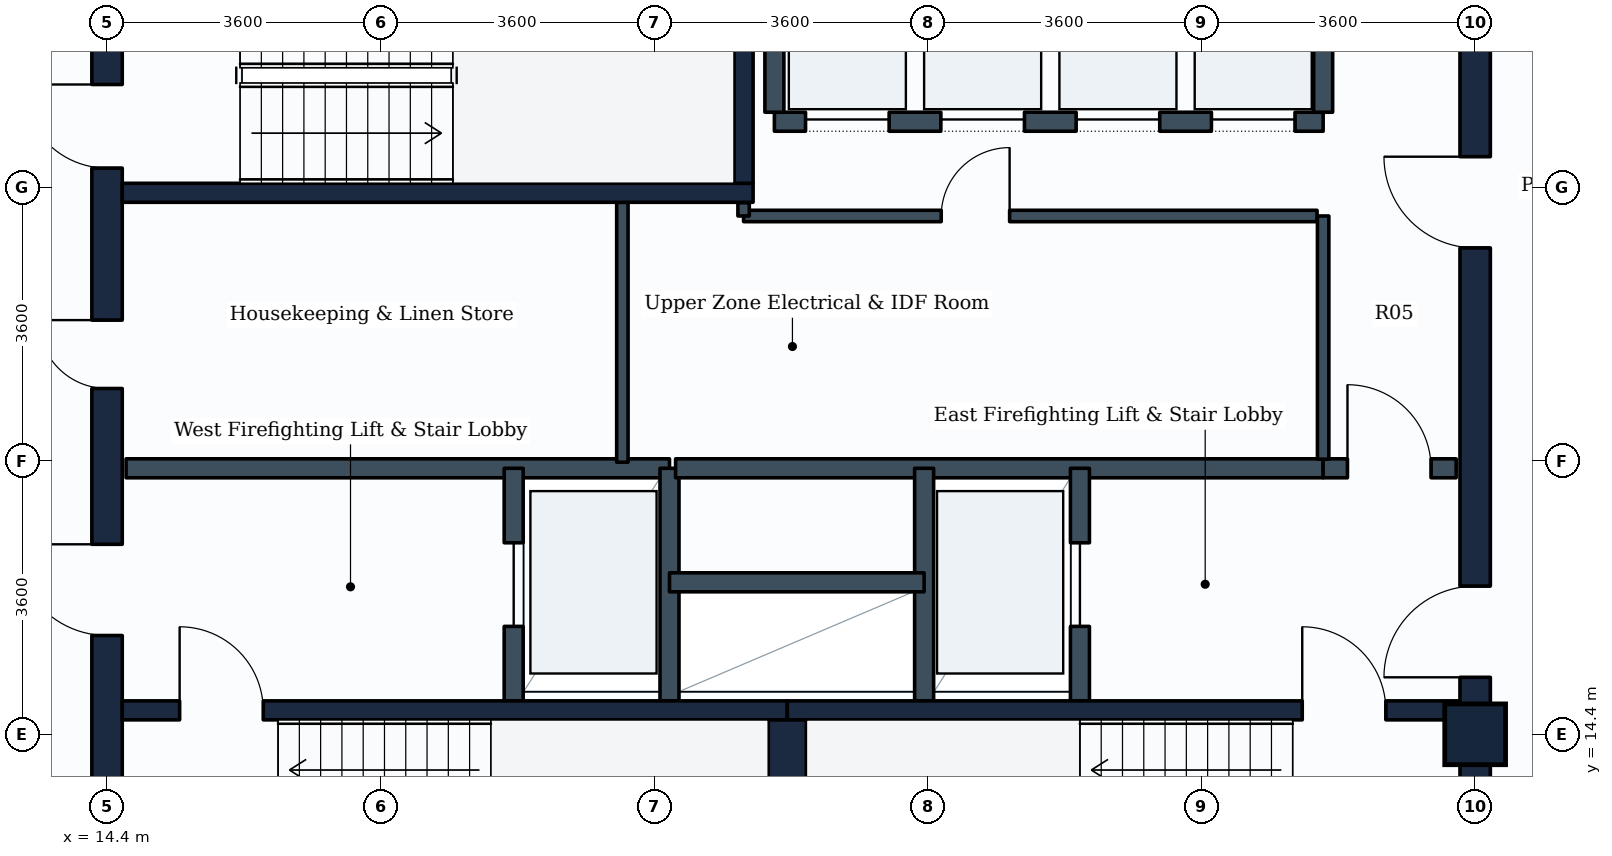
"""IFC4 building model, lengths in metres.
Left out: names, types, materials, properties, quantities, classifications, styles, units other than length and angle.
Written with IfcOpenShell. Run it as: python <this file> out.ifc"""

import sys

from ifc_helpers import new_model, si_unit, direction, frame, frame_2d, origin, origin_2d, place, context, subcontext, project, spatial, rectangle, extrude, element, fill, save


model = new_model("IFC4")
c1 = context("Model", 3, precision=1e-05, world=origin(), true_north=direction((0.0, 1.0)))
c2 = subcontext(c1, "Body", "Model", "MODEL_VIEW")
j1 = project(units=[si_unit("LENGTHUNIT", "METRE"), si_unit("PLANEANGLEUNIT", "RADIAN")], contexts=[c1])
p1 = place(None, origin())
s1 = spatial("IfcSite", under=j1, at=p1, CompositionType="ELEMENT")
p2 = place(p1, origin())
s2 = spatial("IfcBuilding", under=s1, at=p2, CompositionType="ELEMENT")
p3 = place(p2, frame((0.0, 0.0, 266.6)))
s3 = spatial("IfcBuildingStorey", under=s2, at=p3, CompositionType="ELEMENT", Elevation=266.6)
p4 = place(p3, frame((32.4, 14.4, 0.0), z_axis=(0.0, 0.0, 1.0), x_axis=(1.0, 0.0, 0.0)))
e1 = element("IfcColumn", 1, at=p4, inside=s3, PredefinedType="COLUMN", context=c2, shape_type="SweptSolid", body=[
    extrude(rectangle(XDim=0.8, YDim=0.8, at=origin_2d()), origin(), (0.0, 0.0, 1.0), 3.6),
])
p5 = place(p3, frame((14.4, 10.8, 0.0), z_axis=(0.0, 0.0, 1.0), x_axis=(0.0, 1.0, 0.0)))
e2 = element("IfcWall", 2, at=p5, inside=s3, PredefinedType="SHEAR", context=c2, shape_type="SweptSolid", body=[
    extrude(rectangle(XDim=14.4, YDim=0.4, at=frame_2d((7.2, 0.0))), origin(), (0.0, 0.0, 1.0), 3.35),
])
p6 = place(p5, frame((11.05, 0.0, 0.0)))
e3 = element("IfcOpeningElement", 3, at=p6, cuts=e2, PredefinedType="OPENING", context=c2, shape_type="SweptSolid", body=[
    extrude(rectangle(XDim=1.1, YDim=2.1, at=frame_2d((0.55, 1.05))), frame((0.0, 0.21, 0.0), z_axis=(0.0, -1.0, 0.0), x_axis=(1.0, 0.0, 0.0)), (0.0, 0.0, 1.0), 0.42),
])
p7 = place(p5, frame((4.9, 0.0, 0.0)))
e4 = element("IfcOpeningElement", 4, at=p7, cuts=e2, PredefinedType="OPENING", context=c2, shape_type="SweptSolid", body=[
    extrude(rectangle(XDim=1.2, YDim=2.1, at=frame_2d((0.6, 1.05))), frame((0.0, 0.21, 0.0), z_axis=(0.0, -1.0, 0.0), x_axis=(1.0, 0.0, 0.0)), (0.0, 0.0, 1.0), 0.42),
])
p8 = place(p5, frame((8.15, 0.0, 0.0)))
e5 = element("IfcOpeningElement", 5, at=p8, cuts=e2, PredefinedType="OPENING", context=c2, shape_type="SweptSolid", body=[
    extrude(rectangle(XDim=0.9, YDim=2.1, at=frame_2d((0.45, 1.05))), frame((0.0, 0.21, 0.0), z_axis=(0.0, -1.0, 0.0), x_axis=(1.0, 0.0, 0.0)), (0.0, 0.0, 1.0), 0.42),
])
p9 = place(p3, frame((32.4, 10.8, 0.0), z_axis=(0.0, 0.0, 1.0), x_axis=(0.0, 1.0, 0.0)))
e6 = element("IfcWall", 6, at=p9, inside=s3, PredefinedType="SHEAR", context=c2, shape_type="SweptSolid", body=[
    extrude(rectangle(XDim=14.4, YDim=0.4, at=frame_2d((7.2, 0.0))), origin(), (0.0, 0.0, 1.0), 3.35),
])
p10 = place(p9, frame((4.35, 0.0, 0.0)))
e7 = element("IfcOpeningElement", 7, at=p10, cuts=e6, PredefinedType="OPENING", context=c2, shape_type="SweptSolid", body=[
    extrude(rectangle(XDim=1.2, YDim=2.1, at=frame_2d((0.6, 1.05))), frame((0.0, 0.21, 0.0), z_axis=(0.0, -1.0, 0.0), x_axis=(1.0, 0.0, 0.0)), (0.0, 0.0, 1.0), 0.42),
])
p11 = place(p9, frame((10.0, 0.0, 0.0)))
e8 = element("IfcOpeningElement", 8, at=p11, cuts=e6, PredefinedType="OPENING", context=c2, shape_type="SweptSolid", body=[
    extrude(rectangle(XDim=1.2, YDim=2.1, at=frame_2d((0.6, 1.05))), frame((0.0, 0.21, 0.0), z_axis=(0.0, -1.0, 0.0), x_axis=(1.0, 0.0, 0.0)), (0.0, 0.0, 1.0), 0.42),
])
p12 = place(p3, frame((14.6, 14.715, 0.0), z_axis=(0.0, 0.0, 1.0), x_axis=(1.0, 0.0, 0.0)))
e9 = element("IfcWall", 9, at=p12, inside=s3, PredefinedType="SHEAR", context=c2, shape_type="SweptSolid", body=[
    extrude(rectangle(XDim=8.75, YDim=0.25, at=frame_2d((4.375, 0.0))), origin(), (0.0, 0.0, 1.0), 3.35),
])
p13 = place(p12, frame((0.755, 0.0, 0.0)))
e10 = element("IfcOpeningElement", 10, at=p13, cuts=e9, PredefinedType="OPENING", context=c2, shape_type="SweptSolid", body=[
    extrude(rectangle(XDim=1.1, YDim=2.1, at=frame_2d((0.55, 1.05))), frame((0.0, 0.135, 0.0), z_axis=(0.0, -1.0, 0.0), x_axis=(1.0, 0.0, 0.0)), (0.0, 0.0, 1.0), 0.27),
])
p14 = place(p3, frame((23.35, 14.715, 0.0), z_axis=(0.0, 0.0, 1.0), x_axis=(1.0, 0.0, 0.0)))
e11 = element("IfcWall", 11, at=p14, inside=s3, PredefinedType="SHEAR", context=c2, shape_type="SweptSolid", body=[
    extrude(rectangle(XDim=8.85, YDim=0.25, at=frame_2d((4.425, 0.0))), origin(), (0.0, 0.0, 1.0), 3.35),
])
p15 = place(p14, frame((6.775, 0.0, 0.0)))
e12 = element("IfcOpeningElement", 12, at=p15, cuts=e11, PredefinedType="OPENING", context=c2, shape_type="SweptSolid", body=[
    extrude(rectangle(XDim=1.1, YDim=2.1, at=frame_2d((0.55, 1.05))), frame((0.0, 0.135, 0.0), z_axis=(0.0, -1.0, 0.0), x_axis=(1.0, 0.0, 0.0)), (0.0, 0.0, 1.0), 0.27),
])
p16 = place(p3, frame((23.35, 11.75, 0.0), z_axis=(0.0, 0.0, 1.0), x_axis=(0.0, 1.0, 0.0)))
e13 = element("IfcWall", 13, at=p16, inside=s3, PredefinedType="SHEAR", context=c2, shape_type="SweptSolid", body=[
    extrude(rectangle(XDim=2.84, YDim=0.5, at=frame_2d((1.42, 0.0))), origin(), (0.0, 0.0, 1.0), 3.35),
])
p17 = place(p3, frame((14.6, 21.525, 0.0), z_axis=(0.0, 0.0, 1.0), x_axis=(1.0, 0.0, 0.0)))
e14 = element("IfcWall", 14, at=p17, inside=s3, PredefinedType="SHEAR", context=c2, shape_type="SweptSolid", body=[
    extrude(rectangle(XDim=8.3, YDim=0.25, at=frame_2d((4.15, 0.0))), origin(), (0.0, 0.0, 1.0), 3.35),
])
p18 = place(p3, frame((22.775, 21.65, 0.0), z_axis=(0.0, 0.0, 1.0), x_axis=(0.0, 1.0, 0.0)))
e15 = element("IfcWall", 15, at=p18, inside=s3, PredefinedType="SHEAR", context=c2, shape_type="SweptSolid", body=[
    extrude(rectangle(XDim=2.84, YDim=0.25, at=frame_2d((1.42, 0.0))), origin(), (0.0, 0.0, 1.0), 3.35),
])
p19 = place(p3, frame((14.65, 17.9, 0.0), z_axis=(0.0, 0.0, 1.0), x_axis=(1.0, 0.0, 0.0)))
e16 = element("IfcWall", 16, at=p19, inside=s3, PredefinedType="PARTITIONING", context=c2, shape_type="SweptSolid", body=[
    extrude(rectangle(XDim=7.15, YDim=0.25, at=frame_2d((3.575, 0.0))), origin(), (0.0, 0.0, 1.0), 3.335),
])
p20 = place(p3, frame((19.75, 14.84, 0.0), z_axis=(0.0, 0.0, 1.0), x_axis=(0.0, 1.0, 0.0)))
e17 = element("IfcWall", 17, at=p20, inside=s3, PredefinedType="PARTITIONING", context=c2, shape_type="SweptSolid", body=[
    extrude(rectangle(XDim=3.06, YDim=0.25, at=frame_2d((1.53, 0.0))), origin(), (0.0, 0.0, 1.0), 3.335),
])
p21 = place(p20, frame((0.98, 0.0, 0.0)))
e18 = element("IfcOpeningElement", 18, at=p21, cuts=e17, PredefinedType="OPENING", context=c2, shape_type="SweptSolid", body=[
    extrude(rectangle(XDim=1.1, YDim=2.1, at=frame_2d((0.55, 1.05))), frame((0.0, 0.135, 0.0), z_axis=(0.0, -1.0, 0.0), x_axis=(1.0, 0.0, 0.0)), (0.0, 0.0, 1.0), 0.27),
])
p22 = place(p3, frame((21.8, 14.84, 0.0), z_axis=(0.0, 0.0, 1.0), x_axis=(0.0, 1.0, 0.0)))
e19 = element("IfcWall", 19, at=p22, inside=s3, PredefinedType="PARTITIONING", context=c2, shape_type="SweptSolid", body=[
    extrude(rectangle(XDim=3.06, YDim=0.25, at=frame_2d((1.53, 0.0))), origin(), (0.0, 0.0, 1.0), 3.335),
])
p23 = place(p3, frame((21.88, 17.9, 0.0), z_axis=(0.0, 0.0, 1.0), x_axis=(1.0, 0.0, 0.0)))
e20 = element("IfcWall", 20, at=p23, inside=s3, PredefinedType="PARTITIONING", context=c2, shape_type="SweptSolid", body=[
    extrude(rectangle(XDim=8.52, YDim=0.25, at=frame_2d((4.26, 0.0))), origin(), (0.0, 0.0, 1.0), 3.335),
])
p24 = place(p3, frame((30.4, 17.9, 0.0), z_axis=(0.0, 0.0, 1.0), x_axis=(1.0, 0.0, 0.0)))
e21 = element("IfcWall", 21, at=p24, inside=s3, PredefinedType="PARTITIONING", context=c2, shape_type="SweptSolid", body=[
    extrude(rectangle(XDim=1.75, YDim=0.25, at=frame_2d((0.875, 0.0))), origin(), (0.0, 0.0, 1.0), 3.335),
])
p25 = place(p24, frame((0.32, 0.0, 0.0)))
e22 = element("IfcOpeningElement", 22, at=p25, cuts=e21, PredefinedType="OPENING", context=c2, shape_type="SweptSolid", body=[
    extrude(rectangle(XDim=1.1, YDim=2.1, at=frame_2d((0.55, 1.05))), frame((0.0, 0.135, 0.0), z_axis=(0.0, -1.0, 0.0), x_axis=(1.0, 0.0, 0.0)), (0.0, 0.0, 1.0), 0.27),
])
p26 = place(p3, frame((25.15, 14.84, 0.0), z_axis=(0.0, 0.0, 1.0), x_axis=(0.0, 1.0, 0.0)))
e23 = element("IfcWall", 23, at=p26, inside=s3, PredefinedType="PARTITIONING", context=c2, shape_type="SweptSolid", body=[
    extrude(rectangle(XDim=3.06, YDim=0.25, at=frame_2d((1.53, 0.0))), origin(), (0.0, 0.0, 1.0), 3.335),
])
p27 = place(p3, frame((27.2, 14.84, 0.0), z_axis=(0.0, 0.0, 1.0), x_axis=(0.0, 1.0, 0.0)))
e24 = element("IfcWall", 24, at=p27, inside=s3, PredefinedType="PARTITIONING", context=c2, shape_type="SweptSolid", body=[
    extrude(rectangle(XDim=3.06, YDim=0.25, at=frame_2d((1.53, 0.0))), origin(), (0.0, 0.0, 1.0), 3.335),
])
p28 = place(p27, frame((0.98, 0.0, 0.0)))
e25 = element("IfcOpeningElement", 25, at=p28, cuts=e24, PredefinedType="OPENING", context=c2, shape_type="SweptSolid", body=[
    extrude(rectangle(XDim=1.1, YDim=2.1, at=frame_2d((0.55, 1.05))), frame((0.0, 0.135, 0.0), z_axis=(0.0, -1.0, 0.0), x_axis=(1.0, 0.0, 0.0)), (0.0, 0.0, 1.0), 0.27),
])
p29 = place(p3, frame((21.8, 16.4, 0.0), z_axis=(0.0, 0.0, 1.0), x_axis=(1.0, 0.0, 0.0)))
e26 = element("IfcWall", 26, at=p29, inside=s3, PredefinedType="PARTITIONING", context=c2, shape_type="SweptSolid", body=[
    extrude(rectangle(XDim=3.35, YDim=0.25, at=frame_2d((1.675, 0.0))), origin(), (0.0, 0.0, 1.0), 3.335),
])
p30 = place(p3, frame((23.18, 22.46, 0.0), z_axis=(0.0, 0.0, 1.0), x_axis=(1.0, 0.0, 0.0)))
e27 = element("IfcWall", 27, at=p30, inside=s3, PredefinedType="PARTITIONING", context=c2, shape_type="SweptSolid", body=[
    extrude(rectangle(XDim=7.22, YDim=0.25, at=frame_2d((3.61, 0.0))), origin(), (0.0, 0.0, 1.0), 3.335),
])
p31 = place(p30, frame((0.41, 0.0, 0.0)))
e28 = element("IfcOpeningElement", 28, at=p31, cuts=e27, PredefinedType="OPENING", context=c2, shape_type="SweptSolid", body=[
    extrude(rectangle(XDim=1.1, YDim=2.1, at=frame_2d((0.55, 1.05))), frame((0.0, 0.135, 0.0), z_axis=(0.0, -1.0, 0.0), x_axis=(1.0, 0.0, 0.0)), (0.0, 0.0, 1.0), 0.27),
])
p32 = place(p30, frame((2.19, 0.0, 0.0)))
e29 = element("IfcOpeningElement", 29, at=p32, cuts=e27, PredefinedType="OPENING", context=c2, shape_type="SweptSolid", body=[
    extrude(rectangle(XDim=1.1, YDim=2.1, at=frame_2d((0.55, 1.05))), frame((0.0, 0.135, 0.0), z_axis=(0.0, -1.0, 0.0), x_axis=(1.0, 0.0, 0.0)), (0.0, 0.0, 1.0), 0.27),
])
p33 = place(p30, frame((3.97, 0.0, 0.0)))
e30 = element("IfcOpeningElement", 30, at=p33, cuts=e27, PredefinedType="OPENING", context=c2, shape_type="SweptSolid", body=[
    extrude(rectangle(XDim=1.1, YDim=2.1, at=frame_2d((0.55, 1.05))), frame((0.0, 0.135, 0.0), z_axis=(0.0, -1.0, 0.0), x_axis=(1.0, 0.0, 0.0)), (0.0, 0.0, 1.0), 0.27),
])
p34 = place(p30, frame((5.75, 0.0, 0.0)))
e31 = element("IfcOpeningElement", 31, at=p34, cuts=e27, PredefinedType="OPENING", context=c2, shape_type="SweptSolid", body=[
    extrude(rectangle(XDim=1.1, YDim=2.1, at=frame_2d((0.55, 1.05))), frame((0.0, 0.135, 0.0), z_axis=(0.0, -1.0, 0.0), x_axis=(1.0, 0.0, 0.0)), (0.0, 0.0, 1.0), 0.27),
])
for number, where, z_axis, x_axis in (
    (32, (23.18, 22.585, 0.0), (0.0, 0.0, 1.0), (0.0, 1.0, 0.0)),
    (33, (30.4, 22.585, 0.0), (0.0, 0.0, 1.0), (0.0, 1.0, 0.0)),
):
    element("IfcWall", number, at=place(p3, frame(where, z_axis=z_axis, x_axis=x_axis)), inside=s3, PredefinedType="PARTITIONING", context=c2, shape_type="SweptSolid", body=[
        extrude(rectangle(XDim=2.315, YDim=0.25, at=frame_2d((1.157, 0.0))), origin(), (0.0, 0.0, 1.0), 3.335),
    ])
p35 = place(p3, frame((22.775, 21.22, 0.0), z_axis=(0.0, 0.0, 1.0), x_axis=(1.0, 0.0, 0.0)))
e34 = element("IfcWall", 34, at=p35, inside=s3, PredefinedType="PARTITIONING", context=c2, shape_type="SweptSolid", body=[
    extrude(rectangle(XDim=7.545, YDim=0.15, at=frame_2d((3.772, 0.0))), origin(), (0.0, 0.0, 1.0), 3.335),
])
p36 = place(p35, frame((2.6, 0.0, 0.0)))
e35 = element("IfcOpeningElement", 35, at=p36, cuts=e34, PredefinedType="OPENING", context=c2, shape_type="SweptSolid", body=[
    extrude(rectangle(XDim=0.9, YDim=2.1, at=frame_2d((0.45, 1.05))), frame((0.0, 0.085, 0.0), z_axis=(0.0, -1.0, 0.0), x_axis=(1.0, 0.0, 0.0)), (0.0, 0.0, 1.0), 0.17),
])
p37 = place(p3, frame((22.775, 21.22, 0.0), z_axis=(0.0, 0.0, 1.0), x_axis=(0.0, 1.0, 0.0)))
e36 = element("IfcWall", 36, at=p37, inside=s3, PredefinedType="PARTITIONING", context=c2, shape_type="SweptSolid", body=[
    extrude(rectangle(XDim=0.175, YDim=0.15, at=frame_2d((0.087, 0.0))), origin(), (0.0, 0.0, 1.0), 3.335),
])
p38 = place(p3, frame((30.4, 18.02, 0.0), z_axis=(0.0, 0.0, 1.0), x_axis=(0.0, 1.0, 0.0)))
e37 = element("IfcWall", 37, at=p38, inside=s3, PredefinedType="PARTITIONING", context=c2, shape_type="SweptSolid", body=[
    extrude(rectangle(XDim=3.2, YDim=0.15, at=frame_2d((1.6, 0.0))), origin(), (0.0, 0.0, 1.0), 3.335),
])
p39 = place(p3, frame((21.18, 17.98, 0.0), z_axis=(0.0, 0.0, 1.0), x_axis=(0.0, 1.0, 0.0)))
e38 = element("IfcWall", 38, at=p39, inside=s3, PredefinedType="PARTITIONING", context=c2, shape_type="SweptSolid", body=[
    extrude(rectangle(XDim=3.42, YDim=0.15, at=frame_2d((1.71, 0.0))), origin(), (0.0, 0.0, 1.0), 3.335),
])
p40 = place(p13, origin())
e39 = element("IfcDoor", 39, at=p40, inside=s3, OperationType="SINGLE_SWING_LEFT", PredefinedType="DOOR", context=c2, shape_type="SweptSolid", body=[
    extrude(rectangle(XDim=1.1, YDim=2.1, at=frame_2d((0.55, 1.05))), frame((0.0, 0.025, 0.0), z_axis=(0.0, -1.0, 0.0), x_axis=(1.0, 0.0, 0.0)), (0.0, 0.0, 1.0), 0.05),
])
fill(e10, e39)
p41 = place(p15, origin())
e40 = element("IfcDoor", 40, at=p41, inside=s3, OperationType="SINGLE_SWING_LEFT", PredefinedType="DOOR", context=c2, shape_type="SweptSolid", body=[
    extrude(rectangle(XDim=1.1, YDim=2.1, at=frame_2d((0.55, 1.05))), frame((0.0, 0.025, 0.0), z_axis=(0.0, -1.0, 0.0), x_axis=(1.0, 0.0, 0.0)), (0.0, 0.0, 1.0), 0.05),
])
fill(e12, e40)
p42 = place(p6, origin())
e41 = element("IfcDoor", 41, at=p42, inside=s3, OperationType="SINGLE_SWING_RIGHT", PredefinedType="DOOR", context=c2, shape_type="SweptSolid", body=[
    extrude(rectangle(XDim=1.1, YDim=2.1, at=frame_2d((0.55, 1.05))), frame((0.0, 0.025, 0.0), z_axis=(0.0, -1.0, 0.0), x_axis=(1.0, 0.0, 0.0)), (0.0, 0.0, 1.0), 0.05),
])
fill(e3, e41)
p43 = place(p21, origin())
e42 = element("IfcDoor", 42, at=p43, inside=s3, OperationType="SLIDING_TO_LEFT", PredefinedType="DOOR", context=c2, shape_type="SweptSolid", body=[
    extrude(rectangle(XDim=1.1, YDim=2.1, at=frame_2d((0.55, 1.05))), frame((0.0, 0.025, 0.0), z_axis=(0.0, -1.0, 0.0), x_axis=(1.0, 0.0, 0.0)), (0.0, 0.0, 1.0), 0.05),
])
fill(e18, e42)
p44 = place(p28, origin())
e43 = element("IfcDoor", 43, at=p44, inside=s3, OperationType="SLIDING_TO_LEFT", PredefinedType="DOOR", context=c2, shape_type="SweptSolid", body=[
    extrude(rectangle(XDim=1.1, YDim=2.1, at=frame_2d((0.55, 1.05))), frame((0.0, 0.025, 0.0), z_axis=(0.0, -1.0, 0.0), x_axis=(1.0, 0.0, 0.0)), (0.0, 0.0, 1.0), 0.05),
])
fill(e25, e43)
p45 = place(p7, origin())
e44 = element("IfcDoor", 44, at=p45, inside=s3, OperationType="SINGLE_SWING_RIGHT", PredefinedType="DOOR", context=c2, shape_type="SweptSolid", body=[
    extrude(rectangle(XDim=1.2, YDim=2.1, at=frame_2d((0.6, 1.05))), frame((0.0, 0.025, 0.0), z_axis=(0.0, -1.0, 0.0), x_axis=(1.0, 0.0, 0.0)), (0.0, 0.0, 1.0), 0.05),
])
fill(e4, e44)
p46 = place(p10, origin())
e45 = element("IfcDoor", 45, at=p46, inside=s3, OperationType="SINGLE_SWING_LEFT", PredefinedType="DOOR", context=c2, shape_type="SweptSolid", body=[
    extrude(rectangle(XDim=1.2, YDim=2.1, at=frame_2d((0.6, 1.05))), frame((0.0, 0.025, 0.0), z_axis=(0.0, -1.0, 0.0), x_axis=(1.0, 0.0, 0.0)), (0.0, 0.0, 1.0), 0.05),
])
fill(e7, e45)
p47 = place(p25, origin())
e46 = element("IfcDoor", 46, at=p47, inside=s3, OperationType="SINGLE_SWING_LEFT", PredefinedType="DOOR", context=c2, shape_type="SweptSolid", body=[
    extrude(rectangle(XDim=1.1, YDim=2.1, at=frame_2d((0.55, 1.05))), frame((0.0, 0.025, 0.0), z_axis=(0.0, -1.0, 0.0), x_axis=(1.0, 0.0, 0.0)), (0.0, 0.0, 1.0), 0.05),
])
fill(e22, e46)
p48 = place(p31, origin())
e47 = element("IfcDoor", 47, at=p48, inside=s3, OperationType="SLIDING_TO_LEFT", PredefinedType="DOOR", context=c2, shape_type="SweptSolid", body=[
    extrude(rectangle(XDim=1.1, YDim=2.1, at=frame_2d((0.55, 1.05))), frame((0.0, 0.025, 0.0), z_axis=(0.0, -1.0, 0.0), x_axis=(1.0, 0.0, 0.0)), (0.0, 0.0, 1.0), 0.05),
])
fill(e28, e47)
p49 = place(p32, origin())
e48 = element("IfcDoor", 48, at=p49, inside=s3, OperationType="SLIDING_TO_LEFT", PredefinedType="DOOR", context=c2, shape_type="SweptSolid", body=[
    extrude(rectangle(XDim=1.1, YDim=2.1, at=frame_2d((0.55, 1.05))), frame((0.0, 0.025, 0.0), z_axis=(0.0, -1.0, 0.0), x_axis=(1.0, 0.0, 0.0)), (0.0, 0.0, 1.0), 0.05),
])
fill(e29, e48)
p50 = place(p33, origin())
e49 = element("IfcDoor", 49, at=p50, inside=s3, OperationType="SLIDING_TO_LEFT", PredefinedType="DOOR", context=c2, shape_type="SweptSolid", body=[
    extrude(rectangle(XDim=1.1, YDim=2.1, at=frame_2d((0.55, 1.05))), frame((0.0, 0.025, 0.0), z_axis=(0.0, -1.0, 0.0), x_axis=(1.0, 0.0, 0.0)), (0.0, 0.0, 1.0), 0.05),
])
fill(e30, e49)
p51 = place(p34, origin())
e50 = element("IfcDoor", 50, at=p51, inside=s3, OperationType="SLIDING_TO_LEFT", PredefinedType="DOOR", context=c2, shape_type="SweptSolid", body=[
    extrude(rectangle(XDim=1.1, YDim=2.1, at=frame_2d((0.55, 1.05))), frame((0.0, 0.025, 0.0), z_axis=(0.0, -1.0, 0.0), x_axis=(1.0, 0.0, 0.0)), (0.0, 0.0, 1.0), 0.05),
])
fill(e31, e50)
p52 = place(p11, origin())
e51 = element("IfcDoor", 51, at=p52, inside=s3, OperationType="SINGLE_SWING_RIGHT", PredefinedType="DOOR", context=c2, shape_type="SweptSolid", body=[
    extrude(rectangle(XDim=1.2, YDim=2.1, at=frame_2d((0.6, 1.05))), frame((0.0, 0.025, 0.0), z_axis=(0.0, -1.0, 0.0), x_axis=(1.0, 0.0, 0.0)), (0.0, 0.0, 1.0), 0.05),
])
fill(e8, e51)
p53 = place(p8, origin())
e52 = element("IfcDoor", 52, at=p53, inside=s3, OperationType="SINGLE_SWING_RIGHT", PredefinedType="DOOR", context=c2, shape_type="SweptSolid", body=[
    extrude(rectangle(XDim=0.9, YDim=2.1, at=frame_2d((0.45, 1.05))), frame((0.0, 0.025, 0.0), z_axis=(0.0, -1.0, 0.0), x_axis=(1.0, 0.0, 0.0)), (0.0, 0.0, 1.0), 0.05),
])
fill(e5, e52)
p54 = place(p36, origin())
e53 = element("IfcDoor", 53, at=p54, inside=s3, OperationType="SINGLE_SWING_RIGHT", PredefinedType="DOOR", context=c2, shape_type="SweptSolid", body=[
    extrude(rectangle(XDim=0.9, YDim=2.1, at=frame_2d((0.45, 1.05))), frame((0.0, 0.025, 0.0), z_axis=(0.0, -1.0, 0.0), x_axis=(1.0, 0.0, 0.0)), (0.0, 0.0, 1.0), 0.05),
])
fill(e35, e53)
save(model, sys.argv[1])
